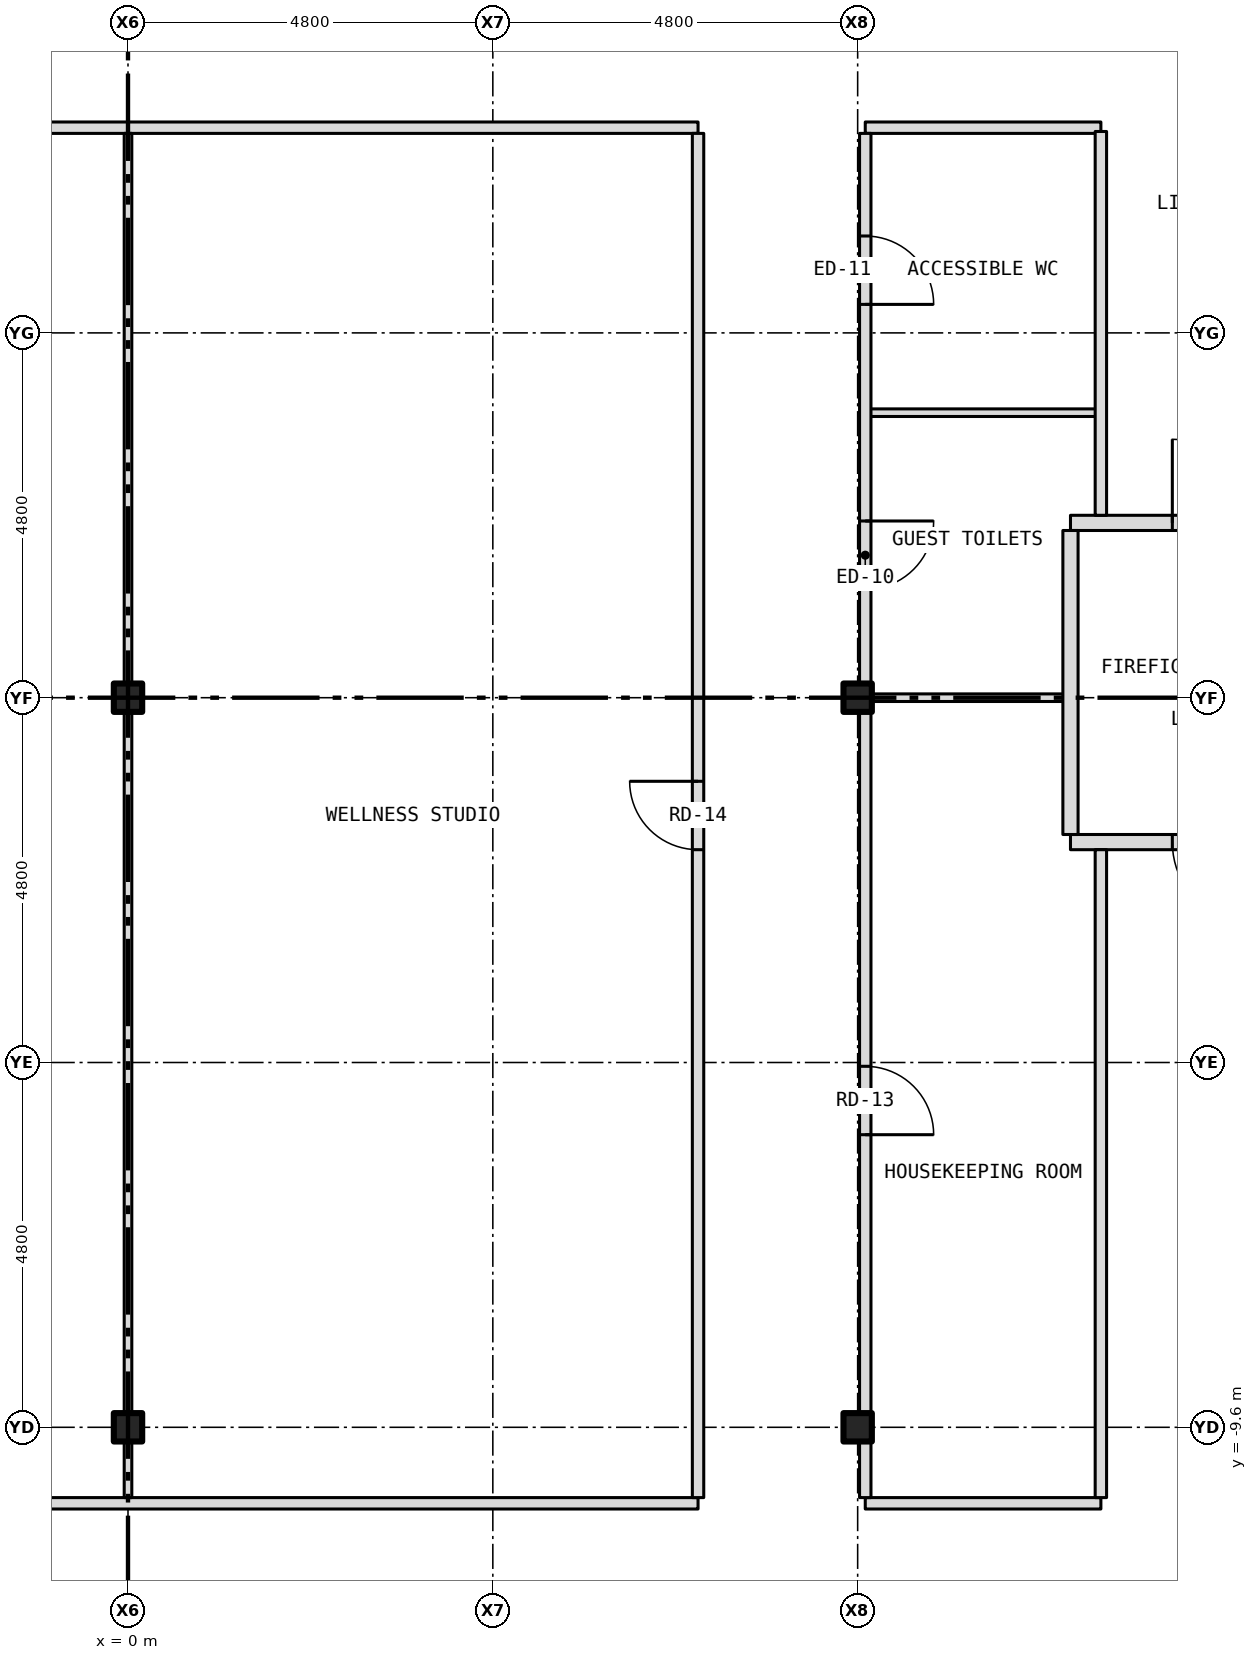
"""IFC4 building model, lengths in metres.
Left out: names, types, materials, properties, quantities, classifications, styles, units other than length and angle.
Written with IfcOpenShell. Run it as: python <this file> out.ifc"""

import sys

from ifc_helpers import new_model, si_unit, direction, frame, frame_2d, origin, origin_2d, place, context, subcontext, project, spatial, rectangle, i_section, extrude, element, fill, save


model = new_model("IFC4")
c1 = context("Model", 3, precision=1e-05, world=origin(), true_north=direction((0.0, 1.0)))
c2 = subcontext(c1, "Body", "Model", "MODEL_VIEW")
j1 = project(units=[si_unit("LENGTHUNIT", "METRE"), si_unit("PLANEANGLEUNIT", "RADIAN")], contexts=[c1])
p1 = place(None, origin())
s1 = spatial("IfcSite", under=j1, at=p1, CompositionType="ELEMENT")
p2 = place(p1, origin())
s2 = spatial("IfcBuilding", under=s1, at=p2, CompositionType="ELEMENT")
p3 = place(p2, frame((0.0, 0.0, 191.0)))
s3 = spatial("IfcBuildingStorey", under=s2, at=p3, CompositionType="ELEMENT", Elevation=191.0)
for number, where, z_axis, x_axis in (
    (1, (0.0, -9.6, -0.15), (0.0, 0.0, 1.0), (1.0, 0.0, 0.0)),
    (2, (0.0, 0.0, -0.15), (0.0, 0.0, 1.0), (1.0, 0.0, 0.0)),
    (3, (9.6, -9.6, -0.15), (0.0, 0.0, 1.0), (1.0, 0.0, 0.0)),
    (4, (9.6, 0.0, -0.15), (0.0, 0.0, 1.0), (1.0, 0.0, 0.0)),
):
    element("IfcColumn", number, at=place(p3, frame(where, z_axis=z_axis, x_axis=x_axis)), inside=s3, PredefinedType="COLUMN", context=c2, shape_type="SweptSolid", body=[
        extrude(i_section(OverallWidth=0.373, OverallDepth=0.373, WebThickness=0.016, FlangeThickness=0.026, at=origin_2d()), origin(), (0.0, 0.0, 1.0), 3.5),
    ])
p4 = place(p3, frame((-12.8, -10.6, 0.0), z_axis=(0.0, 0.0, 1.0), x_axis=(1.0, 0.0, 0.0)))
e5 = element("IfcWall", 5, at=p4, inside=s3, PredefinedType="PARTITIONING", context=c2, shape_type="SweptSolid", body=[
    extrude(rectangle(XDim=20.3, YDim=0.15, at=frame_2d((10.15, 0.0))), origin(), (0.0, 0.0, 1.0), 3.35),
])
p5 = place(p3, frame((9.7, -10.6, 0.0), z_axis=(0.0, 0.0, 1.0), x_axis=(1.0, 0.0, 0.0)))
e6 = element("IfcWall", 6, at=p5, inside=s3, PredefinedType="PARTITIONING", context=c2, shape_type="SweptSolid", body=[
    extrude(rectangle(XDim=3.1, YDim=0.15, at=frame_2d((1.55, 0.0))), origin(), (0.0, 0.0, 1.0), 3.35),
])
p6 = place(p3, frame((12.4, -1.9, 0.0), z_axis=(0.0, 0.0, 1.0), x_axis=(1.0, 0.0, 0.0)))
e7 = element("IfcWall", 7, at=p6, inside=s3, PredefinedType="PARTITIONING", context=c2, shape_type="SweptSolid", body=[
    extrude(rectangle(XDim=3.28, YDim=0.2, at=frame_2d((1.64, 0.0))), origin(), (0.0, 0.0, 1.0), 3.35),
])
p7 = place(p6, frame((1.34, 0.0, 0.0)))
e8 = element("IfcOpeningElement", 8, at=p7, cuts=e7, PredefinedType="OPENING", context=c2, shape_type="SweptSolid", body=[
    extrude(rectangle(XDim=1.1, YDim=2.1, at=frame_2d((0.55, 1.05))), frame((0.0, 0.112, 0.0), z_axis=(0.0, -1.0, 0.0), x_axis=(1.0, 0.0, 0.0)), (0.0, 0.0, 1.0), 0.224),
])
p8 = place(p3, frame((9.7, 0.0, 0.0), z_axis=(0.0, 0.0, 1.0), x_axis=(1.0, 0.0, 0.0)))
e9 = element("IfcWall", 9, at=p8, inside=s3, PredefinedType="PARTITIONING", context=c2, shape_type="SweptSolid", body=[
    extrude(rectangle(XDim=2.7, YDim=0.1, at=frame_2d((1.35, 0.0))), origin(), (0.0, 0.0, 1.0), 2.728),
])
p9 = place(p3, frame((12.4, 2.3, 0.0), z_axis=(0.0, 0.0, 1.0), x_axis=(1.0, 0.0, 0.0)))
e10 = element("IfcWall", 10, at=p9, inside=s3, PredefinedType="PARTITIONING", context=c2, shape_type="SweptSolid", body=[
    extrude(rectangle(XDim=3.28, YDim=0.2, at=frame_2d((1.64, 0.0))), origin(), (0.0, 0.0, 1.0), 3.35),
])
p10 = place(p9, frame((1.34, 0.0, 0.0)))
e11 = element("IfcOpeningElement", 11, at=p10, cuts=e10, PredefinedType="OPENING", context=c2, shape_type="SweptSolid", body=[
    extrude(rectangle(XDim=1.1, YDim=2.1, at=frame_2d((0.55, 1.05))), frame((0.0, 0.112, 0.0), z_axis=(0.0, -1.0, 0.0), x_axis=(1.0, 0.0, 0.0)), (0.0, 0.0, 1.0), 0.224),
])
p11 = place(p3, frame((9.7, 3.75, 0.0), z_axis=(0.0, 0.0, 1.0), x_axis=(1.0, 0.0, 0.0)))
e12 = element("IfcWall", 12, at=p11, inside=s3, PredefinedType="PARTITIONING", context=c2, shape_type="SweptSolid", body=[
    extrude(rectangle(XDim=3.1, YDim=0.1, at=frame_2d((1.55, 0.0))), origin(), (0.0, 0.0, 1.0), 3.35),
])
p12 = place(p3, frame((-12.8, 7.5, 0.0), z_axis=(0.0, 0.0, 1.0), x_axis=(1.0, 0.0, 0.0)))
e13 = element("IfcWall", 13, at=p12, inside=s3, PredefinedType="PARTITIONING", context=c2, shape_type="SweptSolid", body=[
    extrude(rectangle(XDim=20.3, YDim=0.15, at=frame_2d((10.15, 0.0))), origin(), (0.0, 0.0, 1.0), 3.35),
])
p13 = place(p12, frame((5.95, 0.0, 0.0)))
e14 = element("IfcOpeningElement", 14, at=p13, cuts=e13, PredefinedType="OPENING", context=c2, shape_type="SweptSolid", body=[
    extrude(rectangle(XDim=0.9, YDim=2.1, at=frame_2d((0.45, 1.05))), frame((0.0, 0.087, 0.0), z_axis=(0.0, -1.0, 0.0), x_axis=(1.0, 0.0, 0.0)), (0.0, 0.0, 1.0), 0.174),
])
p14 = place(p3, frame((9.7, 7.5, 0.0), z_axis=(0.0, 0.0, 1.0), x_axis=(1.0, 0.0, 0.0)))
e15 = element("IfcWall", 15, at=p14, inside=s3, PredefinedType="PARTITIONING", context=c2, shape_type="SweptSolid", body=[
    extrude(rectangle(XDim=3.1, YDim=0.15, at=frame_2d((1.55, 0.0))), origin(), (0.0, 0.0, 1.0), 3.35),
])
p15 = place(p3, frame((0.0, -10.525, 0.0), z_axis=(0.0, 0.0, 1.0), x_axis=(0.0, 1.0, 0.0)))
e16 = element("IfcWall", 16, at=p15, inside=s3, PredefinedType="PARTITIONING", context=c2, shape_type="SweptSolid", body=[
    extrude(rectangle(XDim=0.738, YDim=0.1, at=frame_2d((0.369, 0.0))), origin(), (0.0, 0.0, 1.0), 2.728),
])
p16 = place(p3, frame((0.0, -9.787, 0.0), z_axis=(0.0, 0.0, 1.0), x_axis=(0.0, 1.0, 0.0)))
e17 = element("IfcWall", 17, at=p16, inside=s3, PredefinedType="PARTITIONING", context=c2, shape_type="SweptSolid", body=[
    extrude(rectangle(XDim=0.374, YDim=0.1, at=frame_2d((0.187, 0.0))), origin(), (0.0, 0.0, 1.0), 3.35),
])
p17 = place(p3, frame((0.0, -9.413, 0.0), z_axis=(0.0, 0.0, 1.0), x_axis=(0.0, 1.0, 0.0)))
e18 = element("IfcWall", 18, at=p17, inside=s3, PredefinedType="PARTITIONING", context=c2, shape_type="SweptSolid", body=[
    extrude(rectangle(XDim=9.226, YDim=0.1, at=frame_2d((4.613, 0.0))), origin(), (0.0, 0.0, 1.0), 2.728),
])
p18 = place(p3, frame((0.0, -0.187, 0.0), z_axis=(0.0, 0.0, 1.0), x_axis=(0.0, 1.0, 0.0)))
e19 = element("IfcWall", 19, at=p18, inside=s3, PredefinedType="PARTITIONING", context=c2, shape_type="SweptSolid", body=[
    extrude(rectangle(XDim=0.374, YDim=0.1, at=frame_2d((0.187, 0.0))), origin(), (0.0, 0.0, 1.0), 3.35),
])
p19 = place(p3, frame((0.0, 0.187, 0.0), z_axis=(0.0, 0.0, 1.0), x_axis=(0.0, 1.0, 0.0)))
e20 = element("IfcWall", 20, at=p19, inside=s3, PredefinedType="PARTITIONING", context=c2, shape_type="SweptSolid", body=[
    extrude(rectangle(XDim=7.238, YDim=0.1, at=frame_2d((3.619, 0.0))), origin(), (0.0, 0.0, 1.0), 2.728),
])
p20 = place(p3, frame((7.5, -10.525, 0.0), z_axis=(0.0, 0.0, 1.0), x_axis=(0.0, 1.0, 0.0)))
e21 = element("IfcWall", 21, at=p20, inside=s3, PredefinedType="PARTITIONING", context=c2, shape_type="SweptSolid", body=[
    extrude(rectangle(XDim=17.95, YDim=0.15, at=frame_2d((8.975, 0.0))), origin(), (0.0, 0.0, 1.0), 3.35),
])
p21 = place(p20, frame((8.525, 0.0, 0.0)))
e22 = element("IfcOpeningElement", 22, at=p21, cuts=e21, PredefinedType="OPENING", context=c2, shape_type="SweptSolid", body=[
    extrude(rectangle(XDim=0.9, YDim=2.1, at=frame_2d((0.45, 1.05))), frame((0.0, 0.087, 0.0), z_axis=(0.0, -1.0, 0.0), x_axis=(1.0, 0.0, 0.0)), (0.0, 0.0, 1.0), 0.174),
])
p22 = place(p3, frame((9.7, -10.525, 0.0), z_axis=(0.0, 0.0, 1.0), x_axis=(0.0, 1.0, 0.0)))
e23 = element("IfcWall", 23, at=p22, inside=s3, PredefinedType="PARTITIONING", context=c2, shape_type="SweptSolid", body=[
    extrude(rectangle(XDim=0.738, YDim=0.15, at=frame_2d((0.369, 0.0))), origin(), (0.0, 0.0, 1.0), 2.728),
])
p23 = place(p3, frame((9.7, -9.787, 0.0), z_axis=(0.0, 0.0, 1.0), x_axis=(0.0, 1.0, 0.0)))
e24 = element("IfcWall", 24, at=p23, inside=s3, PredefinedType="PARTITIONING", context=c2, shape_type="SweptSolid", body=[
    extrude(rectangle(XDim=0.374, YDim=0.15, at=frame_2d((0.187, 0.0))), origin(), (0.0, 0.0, 1.0), 3.35),
])
p24 = place(p3, frame((9.7, -9.413, 0.0), z_axis=(0.0, 0.0, 1.0), x_axis=(0.0, 1.0, 0.0)))
e25 = element("IfcWall", 25, at=p24, inside=s3, PredefinedType="PARTITIONING", context=c2, shape_type="SweptSolid", body=[
    extrude(rectangle(XDim=9.226, YDim=0.15, at=frame_2d((4.613, 0.0))), origin(), (0.0, 0.0, 1.0), 2.728),
])
p25 = place(p24, frame((3.663, 0.0, 0.0)))
e26 = element("IfcOpeningElement", 26, at=p25, cuts=e25, PredefinedType="OPENING", context=c2, shape_type="SweptSolid", body=[
    extrude(rectangle(XDim=0.9, YDim=2.1, at=frame_2d((0.45, 1.05))), frame((0.0, 0.087, 0.0), z_axis=(0.0, -1.0, 0.0), x_axis=(1.0, 0.0, 0.0)), (0.0, 0.0, 1.0), 0.174),
])
p26 = place(p3, frame((9.7, -0.187, 0.0), z_axis=(0.0, 0.0, 1.0), x_axis=(0.0, 1.0, 0.0)))
e27 = element("IfcWall", 27, at=p26, inside=s3, PredefinedType="PARTITIONING", context=c2, shape_type="SweptSolid", body=[
    extrude(rectangle(XDim=0.374, YDim=0.15, at=frame_2d((0.187, 0.0))), origin(), (0.0, 0.0, 1.0), 3.35),
])
p27 = place(p3, frame((9.7, 0.187, 0.0), z_axis=(0.0, 0.0, 1.0), x_axis=(0.0, 1.0, 0.0)))
e28 = element("IfcWall", 28, at=p27, inside=s3, PredefinedType="PARTITIONING", context=c2, shape_type="SweptSolid", body=[
    extrude(rectangle(XDim=7.238, YDim=0.15, at=frame_2d((3.619, 0.0))), origin(), (0.0, 0.0, 1.0), 2.728),
])
p28 = place(p27, frame((1.238, 0.0, 0.0)))
e29 = element("IfcOpeningElement", 29, at=p28, cuts=e28, PredefinedType="OPENING", context=c2, shape_type="SweptSolid", body=[
    extrude(rectangle(XDim=0.9, YDim=2.1, at=frame_2d((0.45, 1.05))), frame((0.0, 0.087, 0.0), z_axis=(0.0, -1.0, 0.0), x_axis=(1.0, 0.0, 0.0)), (0.0, 0.0, 1.0), 0.174),
])
p29 = place(p27, frame((4.988, 0.0, 0.0)))
e30 = element("IfcOpeningElement", 30, at=p29, cuts=e28, PredefinedType="OPENING", context=c2, shape_type="SweptSolid", body=[
    extrude(rectangle(XDim=0.9, YDim=2.1, at=frame_2d((0.45, 1.05))), frame((0.0, 0.087, 0.0), z_axis=(0.0, -1.0, 0.0), x_axis=(1.0, 0.0, 0.0)), (0.0, 0.0, 1.0), 0.174),
])
p30 = place(p3, frame((12.4, -1.8, 0.0), z_axis=(0.0, 0.0, 1.0), x_axis=(0.0, 1.0, 0.0)))
e31 = element("IfcWall", 31, at=p30, inside=s3, PredefinedType="PARTITIONING", context=c2, shape_type="SweptSolid", body=[
    extrude(rectangle(XDim=4.0, YDim=0.2, at=frame_2d((2.0, 0.0))), origin(), (0.0, 0.0, 1.0), 3.35),
])
p31 = place(p3, frame((12.8, -10.525, 0.0), z_axis=(0.0, 0.0, 1.0), x_axis=(0.0, 1.0, 0.0)))
e32 = element("IfcWall", 32, at=p31, inside=s3, PredefinedType="PARTITIONING", context=c2, shape_type="SweptSolid", body=[
    extrude(rectangle(XDim=8.525, YDim=0.15, at=frame_2d((4.262, 0.0))), origin(), (0.0, 0.0, 1.0), 3.35),
])
p32 = place(p3, frame((12.8, 2.4, 0.0), z_axis=(0.0, 0.0, 1.0), x_axis=(0.0, 1.0, 0.0)))
e33 = element("IfcWall", 33, at=p32, inside=s3, PredefinedType="PARTITIONING", context=c2, shape_type="SweptSolid", body=[
    extrude(rectangle(XDim=5.05, YDim=0.15, at=frame_2d((2.525, 0.0))), origin(), (0.0, 0.0, 1.0), 3.35),
])
p33 = place(p10, origin())
e34 = element("IfcDoor", 34, at=p33, inside=s3, OperationType="SINGLE_SWING_LEFT", PredefinedType="DOOR", context=c2, shape_type="SweptSolid", body=[
    extrude(rectangle(XDim=1.1, YDim=2.1, at=frame_2d((0.55, 1.05))), frame((0.0, 0.025, 0.0), z_axis=(0.0, -1.0, 0.0), x_axis=(1.0, 0.0, 0.0)), (0.0, 0.0, 1.0), 0.05),
])
fill(e11, e34)
p34 = place(p7, origin())
e35 = element("IfcDoor", 35, at=p34, inside=s3, OperationType="SINGLE_SWING_RIGHT", PredefinedType="DOOR", context=c2, shape_type="SweptSolid", body=[
    extrude(rectangle(XDim=1.1, YDim=2.1, at=frame_2d((0.55, 1.05))), frame((0.0, 0.025, 0.0), z_axis=(0.0, -1.0, 0.0), x_axis=(1.0, 0.0, 0.0)), (0.0, 0.0, 1.0), 0.05),
])
fill(e8, e35)
p35 = place(p28, origin())
e36 = element("IfcDoor", 36, at=p35, inside=s3, OperationType="SINGLE_SWING_RIGHT", PredefinedType="DOOR", context=c2, shape_type="SweptSolid", body=[
    extrude(rectangle(XDim=0.9, YDim=2.1, at=frame_2d((0.45, 1.05))), frame((0.0, 0.025, 0.0), z_axis=(0.0, -1.0, 0.0), x_axis=(1.0, 0.0, 0.0)), (0.0, 0.0, 1.0), 0.05),
])
fill(e29, e36)
p36 = place(p29, origin())
e37 = element("IfcDoor", 37, at=p36, inside=s3, OperationType="SINGLE_SWING_LEFT", PredefinedType="DOOR", context=c2, shape_type="SweptSolid", body=[
    extrude(rectangle(XDim=0.9, YDim=2.1, at=frame_2d((0.45, 1.05))), frame((0.0, 0.025, 0.0), z_axis=(0.0, -1.0, 0.0), x_axis=(1.0, 0.0, 0.0)), (0.0, 0.0, 1.0), 0.05),
])
fill(e30, e37)
p37 = place(p25, origin())
e38 = element("IfcDoor", 38, at=p37, inside=s3, OperationType="SINGLE_SWING_LEFT", PredefinedType="DOOR", context=c2, shape_type="SweptSolid", body=[
    extrude(rectangle(XDim=0.9, YDim=2.1, at=frame_2d((0.45, 1.05))), frame((0.0, 0.025, 0.0), z_axis=(0.0, -1.0, 0.0), x_axis=(1.0, 0.0, 0.0)), (0.0, 0.0, 1.0), 0.05),
])
fill(e26, e38)
p38 = place(p21, origin())
e39 = element("IfcDoor", 39, at=p38, inside=s3, OperationType="SINGLE_SWING_RIGHT", PredefinedType="DOOR", context=c2, shape_type="SweptSolid", body=[
    extrude(rectangle(XDim=0.9, YDim=2.1, at=frame_2d((0.45, 1.05))), frame((0.0, 0.025, 0.0), z_axis=(0.0, -1.0, 0.0), x_axis=(1.0, 0.0, 0.0)), (0.0, 0.0, 1.0), 0.05),
])
fill(e22, e39)
save(model, sys.argv[1])
